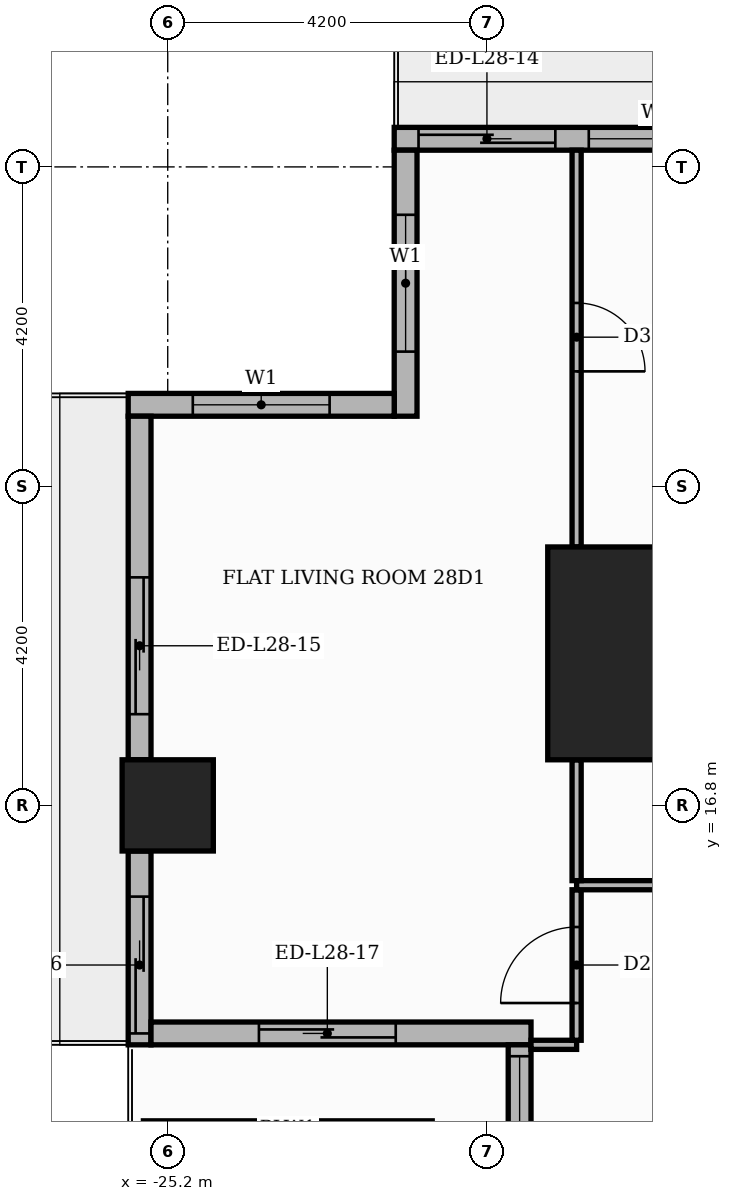
"""IFC4 building model, lengths in metres.
Left out: names, types, materials, properties, quantities, classifications, styles, units other than length and angle.
Written with IfcOpenShell. Run it as: python <this file> out.ifc"""

import sys

from ifc_helpers import new_model, si_unit, direction, frame, frame_2d, origin, origin_2d, place, context, subcontext, project, spatial, rectangle, extrude, element, fill, save


model = new_model("IFC4")
c1 = context("Model", 3, precision=1e-05, world=origin(), true_north=direction((0.0, 1.0)))
c2 = subcontext(c1, "Body", "Model", "MODEL_VIEW")
j1 = project(units=[si_unit("LENGTHUNIT", "METRE"), si_unit("PLANEANGLEUNIT", "RADIAN")], contexts=[c1])
p1 = place(None, origin())
s1 = spatial("IfcSite", under=j1, at=p1, CompositionType="ELEMENT")
p2 = place(p1, origin())
s2 = spatial("IfcBuilding", under=s1, at=p2, CompositionType="ELEMENT")
p3 = place(p2, frame((0.0, 0.0, 118.2)))
s3 = spatial("IfcBuildingStorey", under=s2, at=p3, CompositionType="ELEMENT", Elevation=118.2)
p4 = place(p3, frame((-18.8, 18.8, 0.0), z_axis=(0.0, 0.0, 1.0), x_axis=(1.0, 0.0, 0.0)))
e1 = element("IfcColumn", 1, at=p4, inside=s3, PredefinedType="COLUMN", context=c2, shape_type="SweptSolid", body=[
    extrude(rectangle(XDim=2.8, YDim=2.8, at=origin_2d()), origin(), (0.0, 0.0, 1.0), 3.9),
])
p5 = place(p3, frame((-25.2, 16.8, 0.0), z_axis=(0.0, 0.0, 1.0), x_axis=(1.0, 0.0, 0.0)))
e2 = element("IfcColumn", 2, at=p5, inside=s3, PredefinedType="COLUMN", context=c2, shape_type="SweptSolid", body=[
    extrude(rectangle(XDim=1.2, YDim=1.2, at=origin_2d()), origin(), (0.0, 0.0, 1.0), 3.9),
])
p6 = place(p3, frame((-17.4, 25.57, 0.0), z_axis=(0.0, 0.0, 1.0), x_axis=(-1.0, 0.0, 0.0)))
e3 = element("IfcWall", 3, at=p6, inside=s3, PredefinedType="STANDARD", context=c2, shape_type="SweptSolid", body=[
    extrude(rectangle(XDim=4.82, YDim=0.3, at=frame_2d((2.41, 0.0))), origin(), (0.0, 0.0, 1.0), 3.48),
])
p7 = place(p6, frame((2.7, 0.0, 0.0)))
e4 = element("IfcOpeningElement", 4, at=p7, cuts=e3, PredefinedType="OPENING", context=c2, shape_type="SweptSolid", body=[
    extrude(rectangle(XDim=1.8, YDim=2.4, at=frame_2d((0.9, 1.2))), frame((0.0, 0.16, 0.0), z_axis=(0.0, -1.0, 0.0), x_axis=(1.0, 0.0, 0.0)), (0.0, 0.0, 1.0), 0.32),
])
p8 = place(p6, frame((0.46, 0.0, 0.9)))
e5 = element("IfcOpeningElement", 5, at=p8, cuts=e3, PredefinedType="OPENING", context=c2, shape_type="SweptSolid", body=[
    extrude(rectangle(XDim=1.8, YDim=2.1, at=frame_2d((0.9, 1.05))), frame((0.0, 0.16, 0.0), z_axis=(0.0, -1.0, 0.0), x_axis=(1.0, 0.0, 0.0)), (0.0, 0.0, 1.0), 0.32),
])
p9 = place(p3, frame((-22.07, 25.42, 0.0), z_axis=(0.0, 0.0, 1.0), x_axis=(0.0, -1.0, 0.0)))
e6 = element("IfcWall", 6, at=p9, inside=s3, PredefinedType="STANDARD", context=c2, shape_type="SweptSolid", body=[
    extrude(rectangle(XDim=3.5, YDim=0.3, at=frame_2d((1.75, 0.0))), origin(), (0.0, 0.0, 1.0), 3.48),
])
p10 = place(p9, frame((0.85, 0.0, 0.9)))
e7 = element("IfcOpeningElement", 7, at=p10, cuts=e6, PredefinedType="OPENING", context=c2, shape_type="SweptSolid", body=[
    extrude(rectangle(XDim=1.8, YDim=2.1, at=frame_2d((0.9, 1.05))), frame((0.0, 0.16, 0.0), z_axis=(0.0, -1.0, 0.0), x_axis=(1.0, 0.0, 0.0)), (0.0, 0.0, 1.0), 0.32),
])
p11 = place(p3, frame((-22.22, 22.07, 0.0), z_axis=(0.0, 0.0, 1.0), x_axis=(-1.0, 0.0, 0.0)))
e8 = element("IfcWall", 8, at=p11, inside=s3, PredefinedType="STANDARD", context=c2, shape_type="SweptSolid", body=[
    extrude(rectangle(XDim=3.5, YDim=0.3, at=frame_2d((1.75, 0.0))), origin(), (0.0, 0.0, 1.0), 3.48),
])
p12 = place(p11, frame((0.85, 0.0, 0.9)))
e9 = element("IfcOpeningElement", 9, at=p12, cuts=e8, PredefinedType="OPENING", context=c2, shape_type="SweptSolid", body=[
    extrude(rectangle(XDim=1.8, YDim=2.1, at=frame_2d((0.9, 1.05))), frame((0.0, 0.16, 0.0), z_axis=(0.0, -1.0, 0.0), x_axis=(1.0, 0.0, 0.0)), (0.0, 0.0, 1.0), 0.32),
])
p13 = place(p3, frame((-25.57, 21.92, 0.0), z_axis=(0.0, 0.0, 1.0), x_axis=(0.0, -1.0, 0.0)))
e10 = element("IfcWall", 10, at=p13, inside=s3, PredefinedType="STANDARD", context=c2, shape_type="SweptSolid", body=[
    extrude(rectangle(XDim=4.52, YDim=0.3, at=frame_2d((2.26, 0.0))), origin(), (0.0, 0.0, 1.0), 3.48),
])
p14 = place(p13, frame((2.12, 0.0, 0.0)))
e11 = element("IfcOpeningElement", 11, at=p14, cuts=e10, PredefinedType="OPENING", context=c2, shape_type="SweptSolid", body=[
    extrude(rectangle(XDim=1.8, YDim=2.4, at=frame_2d((0.9, 1.2))), frame((0.0, 0.16, 0.0), z_axis=(0.0, -1.0, 0.0), x_axis=(1.0, 0.0, 0.0)), (0.0, 0.0, 1.0), 0.32),
])
p15 = place(p3, frame((-25.57, 16.2, 0.0), z_axis=(0.0, 0.0, 1.0), x_axis=(0.0, -1.0, 0.0)))
e12 = element("IfcWall", 12, at=p15, inside=s3, PredefinedType="STANDARD", context=c2, shape_type="SweptSolid", body=[
    extrude(rectangle(XDim=2.55, YDim=0.3, at=frame_2d((1.275, 0.0))), origin(), (0.0, 0.0, 1.0), 3.48),
])
p16 = place(p15, frame((0.6, 0.0, 0.0)))
e13 = element("IfcOpeningElement", 13, at=p16, cuts=e12, PredefinedType="OPENING", context=c2, shape_type="SweptSolid", body=[
    extrude(rectangle(XDim=1.8, YDim=2.4, at=frame_2d((0.9, 1.2))), frame((0.0, 0.16, 0.0), z_axis=(0.0, -1.0, 0.0), x_axis=(1.0, 0.0, 0.0)), (0.0, 0.0, 1.0), 0.32),
])
p17 = place(p3, frame((-25.42, 13.8, 0.0), z_axis=(0.0, 0.0, 1.0), x_axis=(1.0, 0.0, 0.0)))
e14 = element("IfcWall", 14, at=p17, inside=s3, PredefinedType="STANDARD", context=c2, shape_type="SweptSolid", body=[
    extrude(rectangle(XDim=5.0, YDim=0.3, at=frame_2d((2.5, 0.0))), origin(), (0.0, 0.0, 1.0), 3.48),
])
p18 = place(p17, frame((1.42, 0.0, 0.0)))
e15 = element("IfcOpeningElement", 15, at=p18, cuts=e14, PredefinedType="OPENING", context=c2, shape_type="SweptSolid", body=[
    extrude(rectangle(XDim=1.8, YDim=2.4, at=frame_2d((0.9, 1.2))), frame((0.0, 0.16, 0.0), z_axis=(0.0, -1.0, 0.0), x_axis=(1.0, 0.0, 0.0)), (0.0, 0.0, 1.0), 0.32),
])
p19 = place(p3, frame((-20.57, 13.65, 0.0), z_axis=(0.0, 0.0, 1.0), x_axis=(0.0, -1.0, 0.0)))
e16 = element("IfcWall", 16, at=p19, inside=s3, PredefinedType="STANDARD", context=c2, shape_type="SweptSolid", body=[
    extrude(rectangle(XDim=27.6, YDim=0.3, at=frame_2d((13.8, 0.0))), origin(), (0.0, 0.0, 1.0), 3.48),
])
p20 = place(p19, frame((0.15, 0.0, 0.9)))
e17 = element("IfcOpeningElement", 17, at=p20, cuts=e16, PredefinedType="OPENING", context=c2, shape_type="SweptSolid", body=[
    extrude(rectangle(XDim=6.0, YDim=2.1, at=frame_2d((3.0, 1.05))), frame((0.0, 0.16, 0.0), z_axis=(0.0, -1.0, 0.0), x_axis=(1.0, 0.0, 0.0)), (0.0, 0.0, 1.0), 0.32),
])
p21 = place(p19, frame((6.45, 0.0, 0.9)))
e18 = element("IfcOpeningElement", 18, at=p21, cuts=e16, PredefinedType="OPENING", context=c2, shape_type="SweptSolid", body=[
    extrude(rectangle(XDim=1.8, YDim=2.1, at=frame_2d((0.9, 1.05))), frame((0.0, 0.16, 0.0), z_axis=(0.0, -1.0, 0.0), x_axis=(1.0, 0.0, 0.0)), (0.0, 0.0, 1.0), 0.32),
])
p22 = place(p19, frame((8.55, 0.0, 0.9)))
e19 = element("IfcOpeningElement", 19, at=p22, cuts=e16, PredefinedType="OPENING", context=c2, shape_type="SweptSolid", body=[
    extrude(rectangle(XDim=6.0, YDim=2.1, at=frame_2d((3.0, 1.05))), frame((0.0, 0.16, 0.0), z_axis=(0.0, -1.0, 0.0), x_axis=(1.0, 0.0, 0.0)), (0.0, 0.0, 1.0), 0.32),
])
p23 = place(p19, frame((14.85, 0.0, 0.9)))
e20 = element("IfcOpeningElement", 20, at=p23, cuts=e16, PredefinedType="OPENING", context=c2, shape_type="SweptSolid", body=[
    extrude(rectangle(XDim=6.0, YDim=2.1, at=frame_2d((3.0, 1.05))), frame((0.0, 0.16, 0.0), z_axis=(0.0, -1.0, 0.0), x_axis=(1.0, 0.0, 0.0)), (0.0, 0.0, 1.0), 0.32),
])
p24 = place(p19, frame((21.15, 0.0, 0.9)))
e21 = element("IfcOpeningElement", 21, at=p24, cuts=e16, PredefinedType="OPENING", context=c2, shape_type="SweptSolid", body=[
    extrude(rectangle(XDim=6.0, YDim=2.1, at=frame_2d((3.0, 1.05))), frame((0.0, 0.16, 0.0), z_axis=(0.0, -1.0, 0.0), x_axis=(1.0, 0.0, 0.0)), (0.0, 0.0, 1.0), 0.32),
])
p25 = place(p3, frame((-20.42, 13.65, 0.0), z_axis=(0.0, 0.0, 1.0), x_axis=(1.0, 0.0, 0.0)))
e22 = element("IfcWall", 22, at=p25, inside=s3, PredefinedType="PARTITIONING", context=c2, shape_type="SweptSolid", body=[
    extrude(rectangle(XDim=0.6, YDim=0.12, at=frame_2d((0.3, 0.0))), origin(), (0.0, 0.0, 1.0), 3.48),
])
p26 = place(p3, frame((-19.82, 13.71, 0.0), z_axis=(0.0, 0.0, 1.0), x_axis=(0.0, 1.0, 0.0)))
e23 = element("IfcWall", 23, at=p26, inside=s3, PredefinedType="PARTITIONING", context=c2, shape_type="SweptSolid", body=[
    extrude(rectangle(XDim=1.98, YDim=0.12, at=frame_2d((0.99, 0.0))), origin(), (0.0, 0.0, 1.0), 3.48),
])
p27 = place(p26, frame((0.49, 0.0, 0.0)))
e24 = element("IfcOpeningElement", 24, at=p27, cuts=e23, PredefinedType="OPENING", context=c2, shape_type="SweptSolid", body=[
    extrude(rectangle(XDim=1.0, YDim=2.1, at=frame_2d((0.5, 1.05))), frame((0.0, 0.07, 0.0), z_axis=(0.0, -1.0, 0.0), x_axis=(1.0, 0.0, 0.0)), (0.0, 0.0, 1.0), 0.14),
])
p28 = place(p3, frame((-19.82, 15.75, 0.0), z_axis=(0.0, 0.0, 1.0), x_axis=(1.0, 0.0, 0.0)))
e25 = element("IfcWall", 25, at=p28, inside=s3, PredefinedType="PARTITIONING", context=c2, shape_type="SweptSolid", body=[
    extrude(rectangle(XDim=6.07, YDim=0.12, at=frame_2d((3.035, 0.0))), origin(), (0.0, 0.0, 1.0), 3.48),
])
p29 = place(p28, frame((2.585, 0.0, 0.0)))
e26 = element("IfcOpeningElement", 26, at=p29, cuts=e25, PredefinedType="OPENING", context=c2, shape_type="SweptSolid", body=[
    extrude(rectangle(XDim=1.0, YDim=2.1, at=frame_2d((0.5, 1.05))), frame((0.0, 0.07, 0.0), z_axis=(0.0, -1.0, 0.0), x_axis=(1.0, 0.0, 0.0)), (0.0, 0.0, 1.0), 0.14),
])
p30 = place(p3, frame((-19.82, 15.81, 0.0), z_axis=(0.0, 0.0, 1.0), x_axis=(0.0, 1.0, 0.0)))
e27 = element("IfcWall", 27, at=p30, inside=s3, PredefinedType="PARTITIONING", context=c2, shape_type="SweptSolid", body=[
    extrude(rectangle(XDim=1.59, YDim=0.12, at=frame_2d((0.795, 0.0))), origin(), (0.0, 0.0, 1.0), 3.48),
])
p31 = place(p3, frame((-19.82, 20.2, 0.0), z_axis=(0.0, 0.0, 1.0), x_axis=(0.0, 1.0, 0.0)))
e28 = element("IfcWall", 28, at=p31, inside=s3, PredefinedType="PARTITIONING", context=c2, shape_type="SweptSolid", body=[
    extrude(rectangle(XDim=5.22, YDim=0.12, at=frame_2d((2.61, 0.0))), origin(), (0.0, 0.0, 1.0), 3.48),
])
p32 = place(p31, frame((2.31, 0.0, 0.0)))
e29 = element("IfcOpeningElement", 29, at=p32, cuts=e28, PredefinedType="OPENING", context=c2, shape_type="SweptSolid", body=[
    extrude(rectangle(XDim=0.9, YDim=2.1, at=frame_2d((0.45, 1.05))), frame((0.0, 0.07, 0.0), z_axis=(0.0, -1.0, 0.0), x_axis=(1.0, 0.0, 0.0)), (0.0, 0.0, 1.0), 0.14),
])
p33 = place(p7, origin())
e30 = element("IfcDoor", 30, at=p33, inside=s3, OperationType="SLIDING_TO_LEFT", PredefinedType="DOOR", context=c2, shape_type="SweptSolid", body=[
    extrude(rectangle(XDim=1.8, YDim=2.4, at=frame_2d((0.9, 1.2))), frame((0.0, 0.025, 0.0), z_axis=(0.0, -1.0, 0.0), x_axis=(1.0, 0.0, 0.0)), (0.0, 0.0, 1.0), 0.05),
])
fill(e4, e30)
p34 = place(p8, origin())
e31 = element("IfcWindow", 31, at=p34, inside=s3, PartitioningType="SINGLE_PANEL", PredefinedType="WINDOW", context=c2, shape_type="SweptSolid", body=[
    extrude(rectangle(XDim=1.8, YDim=2.1, at=frame_2d((0.9, 1.05))), frame((0.0, 0.03, 0.0), z_axis=(0.0, -1.0, 0.0), x_axis=(1.0, 0.0, 0.0)), (0.0, 0.0, 1.0), 0.06),
])
fill(e5, e31)
p35 = place(p10, origin())
e32 = element("IfcWindow", 32, at=p35, inside=s3, PartitioningType="SINGLE_PANEL", PredefinedType="WINDOW", context=c2, shape_type="SweptSolid", body=[
    extrude(rectangle(XDim=1.8, YDim=2.1, at=frame_2d((0.9, 1.05))), frame((0.0, 0.03, 0.0), z_axis=(0.0, -1.0, 0.0), x_axis=(1.0, 0.0, 0.0)), (0.0, 0.0, 1.0), 0.06),
])
fill(e7, e32)
p36 = place(p12, origin())
e33 = element("IfcWindow", 33, at=p36, inside=s3, PartitioningType="SINGLE_PANEL", PredefinedType="WINDOW", context=c2, shape_type="SweptSolid", body=[
    extrude(rectangle(XDim=1.8, YDim=2.1, at=frame_2d((0.9, 1.05))), frame((0.0, 0.03, 0.0), z_axis=(0.0, -1.0, 0.0), x_axis=(1.0, 0.0, 0.0)), (0.0, 0.0, 1.0), 0.06),
])
fill(e9, e33)
p37 = place(p14, origin())
e34 = element("IfcDoor", 34, at=p37, inside=s3, OperationType="SLIDING_TO_RIGHT", PredefinedType="DOOR", context=c2, shape_type="SweptSolid", body=[
    extrude(rectangle(XDim=1.8, YDim=2.4, at=frame_2d((0.9, 1.2))), frame((0.0, 0.025, 0.0), z_axis=(0.0, -1.0, 0.0), x_axis=(1.0, 0.0, 0.0)), (0.0, 0.0, 1.0), 0.05),
])
fill(e11, e34)
p38 = place(p16, origin())
e35 = element("IfcDoor", 35, at=p38, inside=s3, OperationType="SLIDING_TO_LEFT", PredefinedType="DOOR", context=c2, shape_type="SweptSolid", body=[
    extrude(rectangle(XDim=1.8, YDim=2.4, at=frame_2d((0.9, 1.2))), frame((0.0, 0.025, 0.0), z_axis=(0.0, -1.0, 0.0), x_axis=(1.0, 0.0, 0.0)), (0.0, 0.0, 1.0), 0.05),
])
fill(e13, e35)
p39 = place(p18, origin())
e36 = element("IfcDoor", 36, at=p39, inside=s3, OperationType="SLIDING_TO_LEFT", PredefinedType="DOOR", context=c2, shape_type="SweptSolid", body=[
    extrude(rectangle(XDim=1.8, YDim=2.4, at=frame_2d((0.9, 1.2))), frame((0.0, 0.025, 0.0), z_axis=(0.0, -1.0, 0.0), x_axis=(1.0, 0.0, 0.0)), (0.0, 0.0, 1.0), 0.05),
])
fill(e15, e36)
p40 = place(p20, origin())
e37 = element("IfcWindow", 37, at=p40, inside=s3, PartitioningType="SINGLE_PANEL", PredefinedType="WINDOW", context=c2, shape_type="SweptSolid", body=[
    extrude(rectangle(XDim=6.0, YDim=2.1, at=frame_2d((3.0, 1.05))), frame((0.0, 0.03, 0.0), z_axis=(0.0, -1.0, 0.0), x_axis=(1.0, 0.0, 0.0)), (0.0, 0.0, 1.0), 0.06),
])
fill(e17, e37)
p41 = place(p32, frame((0.9, 0.0, 0.0), z_axis=(0.0, 0.0, 1.0), x_axis=(-1.0, 0.0, 0.0)))
e38 = element("IfcDoor", 38, at=p41, inside=s3, OperationType="SINGLE_SWING_LEFT", PredefinedType="DOOR", context=c2, shape_type="SweptSolid", body=[
    extrude(rectangle(XDim=0.9, YDim=2.1, at=frame_2d((0.45, 1.05))), frame((0.0, 0.025, 0.0), z_axis=(0.0, -1.0, 0.0), x_axis=(1.0, 0.0, 0.0)), (0.0, 0.0, 1.0), 0.05),
])
fill(e29, e38)
p42 = place(p27, origin())
e39 = element("IfcDoor", 39, at=p42, inside=s3, OperationType="SINGLE_SWING_LEFT", PredefinedType="DOOR", context=c2, shape_type="SweptSolid", body=[
    extrude(rectangle(XDim=1.0, YDim=2.1, at=frame_2d((0.5, 1.05))), frame((0.0, 0.025, 0.0), z_axis=(0.0, -1.0, 0.0), x_axis=(1.0, 0.0, 0.0)), (0.0, 0.0, 1.0), 0.05),
])
fill(e24, e39)
save(model, sys.argv[1])
